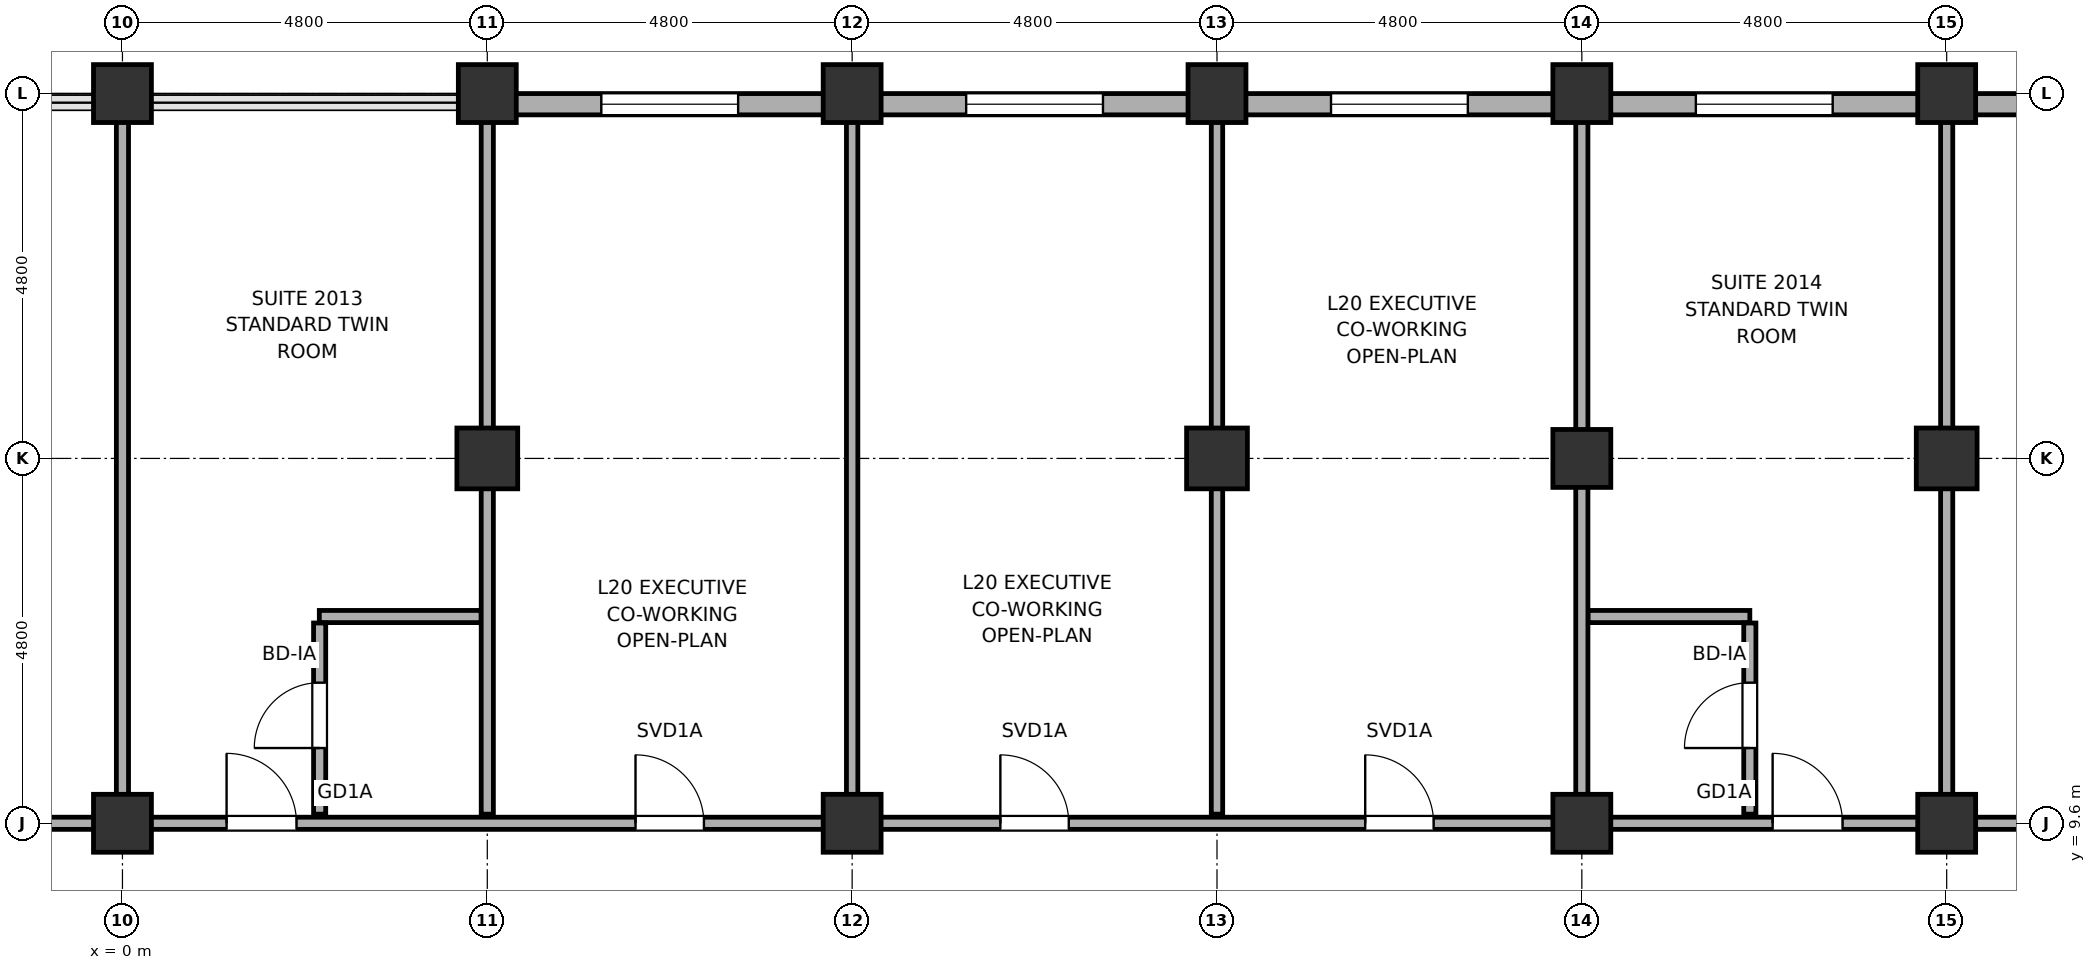
"""IFC4 building model, lengths in metres.
Left out: names, types, materials, properties, quantities, classifications, styles, units other than length and angle.
Written with IfcOpenShell. Run it as: python <this file> out.ifc"""

import sys

from ifc_helpers import new_model, si_unit, direction, frame, frame_2d, origin, origin_2d, place, context, subcontext, project, spatial, rectangle, hollow_rectangle, hollow_circle, extrude, element, fill, save


model = new_model("IFC4")
c1 = context("Model", 3, precision=1e-05, world=origin(), true_north=direction((0.0, 1.0)))
c2 = subcontext(c1, "Body", "Model", "MODEL_VIEW")
j1 = project(units=[si_unit("LENGTHUNIT", "METRE"), si_unit("PLANEANGLEUNIT", "RADIAN")], contexts=[c1])
p1 = place(None, origin())
s1 = spatial("IfcSite", under=j1, at=p1, CompositionType="ELEMENT")
p2 = place(p1, origin())
s2 = spatial("IfcBuilding", under=s1, at=p2, CompositionType="ELEMENT")
p3 = place(p2, frame((0.0, 0.0, 85.5)))
s3 = spatial("IfcBuildingStorey", under=s2, at=p3, CompositionType="ELEMENT", Elevation=85.5)
for number, where, z_axis, x_axis in (
    (1, (0.0, 9.6, 0.0), (0.0, 0.0, 1.0), (1.0, 0.0, 0.0)),
    (2, (0.0, 19.2, 0.0), (0.0, 0.0, 1.0), (1.0, 0.0, 0.0)),
):
    element("IfcColumn", number, at=place(p3, frame(where, z_axis=z_axis, x_axis=x_axis)), inside=s3, PredefinedType="COLUMN", context=c2, shape_type="SweptSolid", body=[
        extrude(hollow_circle(Radius=0.381, WallThickness=0.032, at=origin_2d()), origin(), (0.0, 0.0, 1.0), 3.7),
    ])
p4 = place(p3, frame((4.8, 14.4, 0.0), z_axis=(0.0, 0.0, 1.0), x_axis=(1.0, 0.0, 0.0)))
e3 = element("IfcColumn", 3, at=p4, inside=s3, PredefinedType="COLUMN", context=c2, shape_type="SweptSolid", body=[
    extrude(hollow_rectangle(XDim=0.8, YDim=0.8, WallThickness=0.036, at=origin_2d()), origin(), (0.0, 0.0, 1.0), 3.7),
])
for number, where, z_axis, x_axis in (
    (4, (4.8, 19.2, 0.0), (0.0, 0.0, 1.0), (1.0, 0.0, 0.0)),
    (5, (9.6, 9.6, 0.0), (0.0, 0.0, 1.0), (1.0, 0.0, 0.0)),
    (6, (9.6, 19.2, 0.0), (0.0, 0.0, 1.0), (1.0, 0.0, 0.0)),
):
    element("IfcColumn", number, at=place(p3, frame(where, z_axis=z_axis, x_axis=x_axis)), inside=s3, PredefinedType="COLUMN", context=c2, shape_type="SweptSolid", body=[
        extrude(hollow_circle(Radius=0.381, WallThickness=0.032, at=origin_2d()), origin(), (0.0, 0.0, 1.0), 3.7),
    ])
p5 = place(p3, frame((14.4, 14.4, 0.0), z_axis=(0.0, 0.0, 1.0), x_axis=(1.0, 0.0, 0.0)))
e7 = element("IfcColumn", 7, at=p5, inside=s3, PredefinedType="COLUMN", context=c2, shape_type="SweptSolid", body=[
    extrude(hollow_rectangle(XDim=0.8, YDim=0.8, WallThickness=0.036, at=origin_2d()), origin(), (0.0, 0.0, 1.0), 3.7),
])
for number, where, z_axis, x_axis in (
    (8, (14.4, 19.2, 0.0), (0.0, 0.0, 1.0), (1.0, 0.0, 0.0)),
    (9, (19.2, 9.6, 0.0), (0.0, 0.0, 1.0), (1.0, 0.0, 0.0)),
    (10, (19.2, 14.4, 0.0), (0.0, 0.0, 1.0), (1.0, 0.0, 0.0)),
    (11, (19.2, 19.2, 0.0), (0.0, 0.0, 1.0), (1.0, 0.0, 0.0)),
    (12, (24.0, 9.6, 0.0), (0.0, 0.0, 1.0), (1.0, 0.0, 0.0)),
):
    element("IfcColumn", number, at=place(p3, frame(where, z_axis=z_axis, x_axis=x_axis)), inside=s3, PredefinedType="COLUMN", context=c2, shape_type="SweptSolid", body=[
        extrude(hollow_circle(Radius=0.381, WallThickness=0.032, at=origin_2d()), origin(), (0.0, 0.0, 1.0), 3.7),
    ])
p6 = place(p3, frame((24.0, 14.4, 0.0), z_axis=(0.0, 0.0, 1.0), x_axis=(1.0, 0.0, 0.0)))
e13 = element("IfcColumn", 13, at=p6, inside=s3, PredefinedType="COLUMN", context=c2, shape_type="SweptSolid", body=[
    extrude(hollow_rectangle(XDim=0.8, YDim=0.8, WallThickness=0.036, at=origin_2d()), origin(), (0.0, 0.0, 1.0), 3.7),
])
p7 = place(p3, frame((24.0, 19.2, 0.0), z_axis=(0.0, 0.0, 1.0), x_axis=(1.0, 0.0, 0.0)))
e14 = element("IfcColumn", 14, at=p7, inside=s3, PredefinedType="COLUMN", context=c2, shape_type="SweptSolid", body=[
    extrude(hollow_circle(Radius=0.381, WallThickness=0.032, at=origin_2d()), origin(), (0.0, 0.0, 1.0), 3.7),
])
p8 = place(p3, frame((4.75, 19.06, 0.0), z_axis=(0.0, 0.0, 1.0), x_axis=(1.0, 0.0, 0.0)))
e15 = element("IfcWall", 15, at=p8, inside=s3, PredefinedType="SOLIDWALL", context=c2, shape_type="SweptSolid", body=[
    extrude(rectangle(XDim=25.25, YDim=0.28, at=frame_2d((12.625, 0.0))), origin(), (0.0, 0.0, 1.0), 2.05),
])
p9 = place(p8, frame((1.55, 0.0, 0.75)))
e16 = element("IfcOpeningElement", 16, at=p9, cuts=e15, PredefinedType="OPENING", context=c2, shape_type="SweptSolid", body=[
    extrude(rectangle(XDim=1.8, YDim=1.15, at=frame_2d((0.9, 0.575))), frame((0.0, 0.155, 0.0), z_axis=(0.0, -1.0, 0.0), x_axis=(1.0, 0.0, 0.0)), (0.0, 0.0, 1.0), 0.31),
])
p10 = place(p8, frame((6.35, 0.0, 0.75)))
e17 = element("IfcOpeningElement", 17, at=p10, cuts=e15, PredefinedType="OPENING", context=c2, shape_type="SweptSolid", body=[
    extrude(rectangle(XDim=1.8, YDim=1.15, at=frame_2d((0.9, 0.575))), frame((0.0, 0.155, 0.0), z_axis=(0.0, -1.0, 0.0), x_axis=(1.0, 0.0, 0.0)), (0.0, 0.0, 1.0), 0.31),
])
p11 = place(p8, frame((11.15, 0.0, 0.75)))
e18 = element("IfcOpeningElement", 18, at=p11, cuts=e15, PredefinedType="OPENING", context=c2, shape_type="SweptSolid", body=[
    extrude(rectangle(XDim=1.8, YDim=1.15, at=frame_2d((0.9, 0.575))), frame((0.0, 0.155, 0.0), z_axis=(0.0, -1.0, 0.0), x_axis=(1.0, 0.0, 0.0)), (0.0, 0.0, 1.0), 0.31),
])
p12 = place(p8, frame((15.95, 0.0, 0.75)))
e19 = element("IfcOpeningElement", 19, at=p12, cuts=e15, PredefinedType="OPENING", context=c2, shape_type="SweptSolid", body=[
    extrude(rectangle(XDim=1.8, YDim=1.15, at=frame_2d((0.9, 0.575))), frame((0.0, 0.155, 0.0), z_axis=(0.0, -1.0, 0.0), x_axis=(1.0, 0.0, 0.0)), (0.0, 0.0, 1.0), 0.31),
])
p13 = place(p3, frame((-28.63, 9.6, 0.0), z_axis=(0.0, 0.0, 1.0), x_axis=(1.0, 0.0, 0.0)))
e20 = element("IfcWall", 20, at=p13, inside=s3, PredefinedType="PARTITIONING", context=c2, shape_type="SweptSolid", body=[
    extrude(rectangle(XDim=62.06, YDim=0.16, at=frame_2d((31.03, 0.0))), origin(), (0.0, 0.0, 1.0), 2.05),
])
p14 = place(p13, frame((6.54, 0.0, 0.0)))
e21 = element("IfcOpeningElement", 21, at=p14, cuts=e20, PredefinedType="OPENING", context=c2, shape_type="SweptSolid", body=[
    extrude(rectangle(XDim=0.9, YDim=2.02, at=frame_2d((0.45, 1.01))), frame((0.0, 0.095, 0.0), z_axis=(0.0, -1.0, 0.0), x_axis=(1.0, 0.0, 0.0)), (0.0, 0.0, 1.0), 0.19),
])
p15 = place(p13, frame((54.62, 0.0, 0.0)))
e22 = element("IfcOpeningElement", 22, at=p15, cuts=e20, PredefinedType="OPENING", context=c2, shape_type="SweptSolid", body=[
    extrude(rectangle(XDim=0.9, YDim=2.02, at=frame_2d((0.45, 1.01))), frame((0.0, 0.095, 0.0), z_axis=(0.0, -1.0, 0.0), x_axis=(1.0, 0.0, 0.0)), (0.0, 0.0, 1.0), 0.19),
])
p16 = place(p13, frame((10.69, 0.0, 0.0)))
e23 = element("IfcOpeningElement", 23, at=p16, cuts=e20, PredefinedType="OPENING", context=c2, shape_type="SweptSolid", body=[
    extrude(rectangle(XDim=0.9, YDim=2.02, at=frame_2d((0.45, 1.01))), frame((0.0, 0.095, 0.0), z_axis=(0.0, -1.0, 0.0), x_axis=(1.0, 0.0, 0.0)), (0.0, 0.0, 1.0), 0.19),
])
p17 = place(p13, frame((12.58, 0.0, 0.0)))
e24 = element("IfcOpeningElement", 24, at=p17, cuts=e20, PredefinedType="OPENING", context=c2, shape_type="SweptSolid", body=[
    extrude(rectangle(XDim=0.9, YDim=2.02, at=frame_2d((0.45, 1.01))), frame((0.0, 0.095, 0.0), z_axis=(0.0, -1.0, 0.0), x_axis=(1.0, 0.0, 0.0)), (0.0, 0.0, 1.0), 0.19),
])
p18 = place(p13, frame((16.74, 0.0, 0.0)))
e25 = element("IfcOpeningElement", 25, at=p18, cuts=e20, PredefinedType="OPENING", context=c2, shape_type="SweptSolid", body=[
    extrude(rectangle(XDim=0.92, YDim=2.02, at=frame_2d((0.46, 1.01))), frame((0.0, 0.095, 0.0), z_axis=(0.0, -1.0, 0.0), x_axis=(1.0, 0.0, 0.0)), (0.0, 0.0, 1.0), 0.19),
])
p19 = place(p13, frame((20.4, 0.0, 0.0)))
e26 = element("IfcOpeningElement", 26, at=p19, cuts=e20, PredefinedType="OPENING", context=c2, shape_type="SweptSolid", body=[
    extrude(rectangle(XDim=0.92, YDim=2.02, at=frame_2d((0.46, 1.01))), frame((0.0, 0.095, 0.0), z_axis=(0.0, -1.0, 0.0), x_axis=(1.0, 0.0, 0.0)), (0.0, 0.0, 1.0), 0.19),
])
p20 = place(p13, frame((26.34, 0.0, 0.0)))
e27 = element("IfcOpeningElement", 27, at=p20, cuts=e20, PredefinedType="OPENING", context=c2, shape_type="SweptSolid", body=[
    extrude(rectangle(XDim=0.92, YDim=2.02, at=frame_2d((0.46, 1.01))), frame((0.0, 0.095, 0.0), z_axis=(0.0, -1.0, 0.0), x_axis=(1.0, 0.0, 0.0)), (0.0, 0.0, 1.0), 0.19),
])
p21 = place(p13, frame((30.0, 0.0, 0.0)))
e28 = element("IfcOpeningElement", 28, at=p21, cuts=e20, PredefinedType="OPENING", context=c2, shape_type="SweptSolid", body=[
    extrude(rectangle(XDim=0.92, YDim=2.02, at=frame_2d((0.46, 1.01))), frame((0.0, 0.095, 0.0), z_axis=(0.0, -1.0, 0.0), x_axis=(1.0, 0.0, 0.0)), (0.0, 0.0, 1.0), 0.19),
])
p22 = place(p13, frame((35.38, 0.0, 0.0)))
e29 = element("IfcOpeningElement", 29, at=p22, cuts=e20, PredefinedType="OPENING", context=c2, shape_type="SweptSolid", body=[
    extrude(rectangle(XDim=0.9, YDim=2.02, at=frame_2d((0.45, 1.01))), frame((0.0, 0.095, 0.0), z_axis=(0.0, -1.0, 0.0), x_axis=(1.0, 0.0, 0.0)), (0.0, 0.0, 1.0), 0.19),
])
p23 = place(p13, frame((40.18, 0.0, 0.0)))
e30 = element("IfcOpeningElement", 30, at=p23, cuts=e20, PredefinedType="OPENING", context=c2, shape_type="SweptSolid", body=[
    extrude(rectangle(XDim=0.9, YDim=2.02, at=frame_2d((0.45, 1.01))), frame((0.0, 0.095, 0.0), z_axis=(0.0, -1.0, 0.0), x_axis=(1.0, 0.0, 0.0)), (0.0, 0.0, 1.0), 0.19),
])
p24 = place(p13, frame((44.98, 0.0, 0.0)))
e31 = element("IfcOpeningElement", 31, at=p24, cuts=e20, PredefinedType="OPENING", context=c2, shape_type="SweptSolid", body=[
    extrude(rectangle(XDim=0.9, YDim=2.02, at=frame_2d((0.45, 1.01))), frame((0.0, 0.095, 0.0), z_axis=(0.0, -1.0, 0.0), x_axis=(1.0, 0.0, 0.0)), (0.0, 0.0, 1.0), 0.19),
])
p25 = place(p13, frame((50.34, 0.0, 0.0)))
e32 = element("IfcOpeningElement", 32, at=p25, cuts=e20, PredefinedType="OPENING", context=c2, shape_type="SweptSolid", body=[
    extrude(rectangle(XDim=0.92, YDim=2.02, at=frame_2d((0.46, 1.01))), frame((0.0, 0.095, 0.0), z_axis=(0.0, -1.0, 0.0), x_axis=(1.0, 0.0, 0.0)), (0.0, 0.0, 1.0), 0.19),
])
for number, where, z_axis, x_axis in (
    (33, (2.59, 12.32, 0.0), (0.0, 0.0, 1.0), (1.0, 0.0, 0.0)),
    (34, (19.28, 12.32, 0.0), (0.0, 0.0, 1.0), (1.0, 0.0, 0.0)),
):
    element("IfcWall", number, at=place(p3, frame(where, z_axis=z_axis, x_axis=x_axis)), inside=s3, PredefinedType="PARTITIONING", context=c2, shape_type="SweptSolid", body=[
        extrude(rectangle(XDim=2.13, YDim=0.16, at=frame_2d((1.065, 0.0))), origin(), (0.0, 0.0, 1.0), 2.75),
    ])
p26 = place(p3, frame((0.0, 9.72, 0.0), z_axis=(0.0, 0.0, 1.0), x_axis=(0.0, 1.0, 0.0)))
e35 = element("IfcWall", 35, at=p26, inside=s3, PredefinedType="PARTITIONING", context=c2, shape_type="SweptSolid", body=[
    extrude(rectangle(XDim=9.275, YDim=0.16, at=frame_2d((4.638, 0.0))), origin(), (0.0, 0.0, 1.0), 2.05),
])
p27 = place(p3, frame((2.594, 9.72, 0.0), z_axis=(0.0, 0.0, 1.0), x_axis=(0.0, 1.0, 0.0)))
e36 = element("IfcWall", 36, at=p27, inside=s3, PredefinedType="PARTITIONING", context=c2, shape_type="SweptSolid", body=[
    extrude(rectangle(XDim=2.515, YDim=0.16, at=frame_2d((1.258, 0.0))), origin(), (0.0, 0.0, 1.0), 2.05),
])
p28 = place(p27, frame((0.87, 0.0, 0.0)))
e37 = element("IfcOpeningElement", 37, at=p28, cuts=e36, PredefinedType="OPENING", context=c2, shape_type="SweptSolid", body=[
    extrude(rectangle(XDim=0.86, YDim=2.02, at=frame_2d((0.43, 1.01))), frame((0.0, 0.095, 0.0), z_axis=(0.0, -1.0, 0.0), x_axis=(1.0, 0.0, 0.0)), (0.0, 0.0, 1.0), 0.19),
])
p29 = place(p3, frame((4.8, 9.72, 0.0), z_axis=(0.0, 0.0, 1.0), x_axis=(0.0, 1.0, 0.0)))
e38 = element("IfcWall", 38, at=p29, inside=s3, PredefinedType="PARTITIONING", context=c2, shape_type="SweptSolid", body=[
    extrude(rectangle(XDim=9.19, YDim=0.16, at=frame_2d((4.595, 0.0))), origin(), (0.0, 0.0, 1.0), 2.05),
])
for number, where, z_axis, x_axis in (
    (39, (9.6, 9.72, 0.0), (0.0, 0.0, 1.0), (0.0, 1.0, 0.0)),
    (40, (14.4, 9.72, 0.0), (0.0, 0.0, 1.0), (0.0, 1.0, 0.0)),
):
    element("IfcWall", number, at=place(p3, frame(where, z_axis=z_axis, x_axis=x_axis)), inside=s3, PredefinedType="PARTITIONING", context=c2, shape_type="SweptSolid", body=[
        extrude(rectangle(XDim=9.19, YDim=0.15, at=frame_2d((4.595, 0.0))), origin(), (0.0, 0.0, 1.0), 2.05),
    ])
p30 = place(p3, frame((19.2, 9.72, 0.0), z_axis=(0.0, 0.0, 1.0), x_axis=(0.0, 1.0, 0.0)))
e41 = element("IfcWall", 41, at=p30, inside=s3, PredefinedType="PARTITIONING", context=c2, shape_type="SweptSolid", body=[
    extrude(rectangle(XDim=9.19, YDim=0.16, at=frame_2d((4.595, 0.0))), origin(), (0.0, 0.0, 1.0), 2.05),
])
p31 = place(p3, frame((21.41, 9.72, 0.0), z_axis=(0.0, 0.0, 1.0), x_axis=(0.0, 1.0, 0.0)))
e42 = element("IfcWall", 42, at=p31, inside=s3, PredefinedType="PARTITIONING", context=c2, shape_type="SweptSolid", body=[
    extrude(rectangle(XDim=2.515, YDim=0.16, at=frame_2d((1.258, 0.0))), origin(), (0.0, 0.0, 1.0), 2.05),
])
p32 = place(p31, frame((0.87, 0.0, 0.0)))
e43 = element("IfcOpeningElement", 43, at=p32, cuts=e42, PredefinedType="OPENING", context=c2, shape_type="SweptSolid", body=[
    extrude(rectangle(XDim=0.86, YDim=2.02, at=frame_2d((0.43, 1.01))), frame((0.0, 0.095, 0.0), z_axis=(0.0, -1.0, 0.0), x_axis=(1.0, 0.0, 0.0)), (0.0, 0.0, 1.0), 0.19),
])
p33 = place(p3, frame((24.0, 9.72, 0.0), z_axis=(0.0, 0.0, 1.0), x_axis=(0.0, 1.0, 0.0)))
e44 = element("IfcWall", 44, at=p33, inside=s3, PredefinedType="PARTITIONING", context=c2, shape_type="SweptSolid", body=[
    extrude(rectangle(XDim=9.19, YDim=0.16, at=frame_2d((4.595, 0.0))), origin(), (0.0, 0.0, 1.0), 2.05),
])
p34 = place(p9, origin())
e45 = element("IfcWindow", 45, at=p34, inside=s3, PartitioningType="SINGLE_PANEL", PredefinedType="WINDOW", context=c2, shape_type="SweptSolid", body=[
    extrude(rectangle(XDim=1.8, YDim=1.15, at=frame_2d((0.9, 0.575))), frame((0.0, 0.03, 0.0), z_axis=(0.0, -1.0, 0.0), x_axis=(1.0, 0.0, 0.0)), (0.0, 0.0, 1.0), 0.06),
])
fill(e16, e45)
p35 = place(p10, origin())
e46 = element("IfcWindow", 46, at=p35, inside=s3, PartitioningType="SINGLE_PANEL", PredefinedType="WINDOW", context=c2, shape_type="SweptSolid", body=[
    extrude(rectangle(XDim=1.8, YDim=1.15, at=frame_2d((0.9, 0.575))), frame((0.0, 0.03, 0.0), z_axis=(0.0, -1.0, 0.0), x_axis=(1.0, 0.0, 0.0)), (0.0, 0.0, 1.0), 0.06),
])
fill(e17, e46)
p36 = place(p11, origin())
e47 = element("IfcWindow", 47, at=p36, inside=s3, PartitioningType="SINGLE_PANEL", PredefinedType="WINDOW", context=c2, shape_type="SweptSolid", body=[
    extrude(rectangle(XDim=1.8, YDim=1.15, at=frame_2d((0.9, 0.575))), frame((0.0, 0.03, 0.0), z_axis=(0.0, -1.0, 0.0), x_axis=(1.0, 0.0, 0.0)), (0.0, 0.0, 1.0), 0.06),
])
fill(e18, e47)
p37 = place(p12, origin())
e48 = element("IfcWindow", 48, at=p37, inside=s3, PartitioningType="SINGLE_PANEL", PredefinedType="WINDOW", context=c2, shape_type="SweptSolid", body=[
    extrude(rectangle(XDim=1.8, YDim=1.15, at=frame_2d((0.9, 0.575))), frame((0.0, 0.03, 0.0), z_axis=(0.0, -1.0, 0.0), x_axis=(1.0, 0.0, 0.0)), (0.0, 0.0, 1.0), 0.06),
])
fill(e19, e48)
p38 = place(p21, origin())
e49 = element("IfcDoor", 49, at=p38, inside=s3, OperationType="SINGLE_SWING_RIGHT", PredefinedType="DOOR", context=c2, shape_type="SweptSolid", body=[
    extrude(rectangle(XDim=0.92, YDim=2.02, at=frame_2d((0.46, 1.01))), frame((0.0, 0.025, 0.0), z_axis=(0.0, -1.0, 0.0), x_axis=(1.0, 0.0, 0.0)), (0.0, 0.0, 1.0), 0.05),
])
fill(e28, e49)
p39 = place(p28, origin())
e50 = element("IfcDoor", 50, at=p39, inside=s3, OperationType="SINGLE_SWING_RIGHT", PredefinedType="DOOR", context=c2, shape_type="SweptSolid", body=[
    extrude(rectangle(XDim=0.86, YDim=2.02, at=frame_2d((0.43, 1.01))), frame((0.0, 0.025, 0.0), z_axis=(0.0, -1.0, 0.0), x_axis=(1.0, 0.0, 0.0)), (0.0, 0.0, 1.0), 0.05),
])
fill(e37, e50)
p40 = place(p22, origin())
e51 = element("IfcDoor", 51, at=p40, inside=s3, OperationType="SINGLE_SWING_RIGHT", PredefinedType="DOOR", context=c2, shape_type="SweptSolid", body=[
    extrude(rectangle(XDim=0.9, YDim=2.02, at=frame_2d((0.45, 1.01))), frame((0.0, 0.025, 0.0), z_axis=(0.0, -1.0, 0.0), x_axis=(1.0, 0.0, 0.0)), (0.0, 0.0, 1.0), 0.05),
])
fill(e29, e51)
p41 = place(p23, origin())
e52 = element("IfcDoor", 52, at=p41, inside=s3, OperationType="SINGLE_SWING_RIGHT", PredefinedType="DOOR", context=c2, shape_type="SweptSolid", body=[
    extrude(rectangle(XDim=0.9, YDim=2.02, at=frame_2d((0.45, 1.01))), frame((0.0, 0.025, 0.0), z_axis=(0.0, -1.0, 0.0), x_axis=(1.0, 0.0, 0.0)), (0.0, 0.0, 1.0), 0.05),
])
fill(e30, e52)
p42 = place(p24, origin())
e53 = element("IfcDoor", 53, at=p42, inside=s3, OperationType="SINGLE_SWING_LEFT", PredefinedType="DOOR", context=c2, shape_type="SweptSolid", body=[
    extrude(rectangle(XDim=0.9, YDim=2.02, at=frame_2d((0.45, 1.01))), frame((0.0, 0.025, 0.0), z_axis=(0.0, -1.0, 0.0), x_axis=(1.0, 0.0, 0.0)), (0.0, 0.0, 1.0), 0.05),
])
fill(e31, e53)
p43 = place(p25, origin())
e54 = element("IfcDoor", 54, at=p43, inside=s3, OperationType="SINGLE_SWING_LEFT", PredefinedType="DOOR", context=c2, shape_type="SweptSolid", body=[
    extrude(rectangle(XDim=0.92, YDim=2.02, at=frame_2d((0.46, 1.01))), frame((0.0, 0.025, 0.0), z_axis=(0.0, -1.0, 0.0), x_axis=(1.0, 0.0, 0.0)), (0.0, 0.0, 1.0), 0.05),
])
fill(e32, e54)
p44 = place(p32, origin())
e55 = element("IfcDoor", 55, at=p44, inside=s3, OperationType="SINGLE_SWING_RIGHT", PredefinedType="DOOR", context=c2, shape_type="SweptSolid", body=[
    extrude(rectangle(XDim=0.86, YDim=2.02, at=frame_2d((0.43, 1.01))), frame((0.0, 0.025, 0.0), z_axis=(0.0, -1.0, 0.0), x_axis=(1.0, 0.0, 0.0)), (0.0, 0.0, 1.0), 0.05),
])
fill(e43, e55)
save(model, sys.argv[1])
